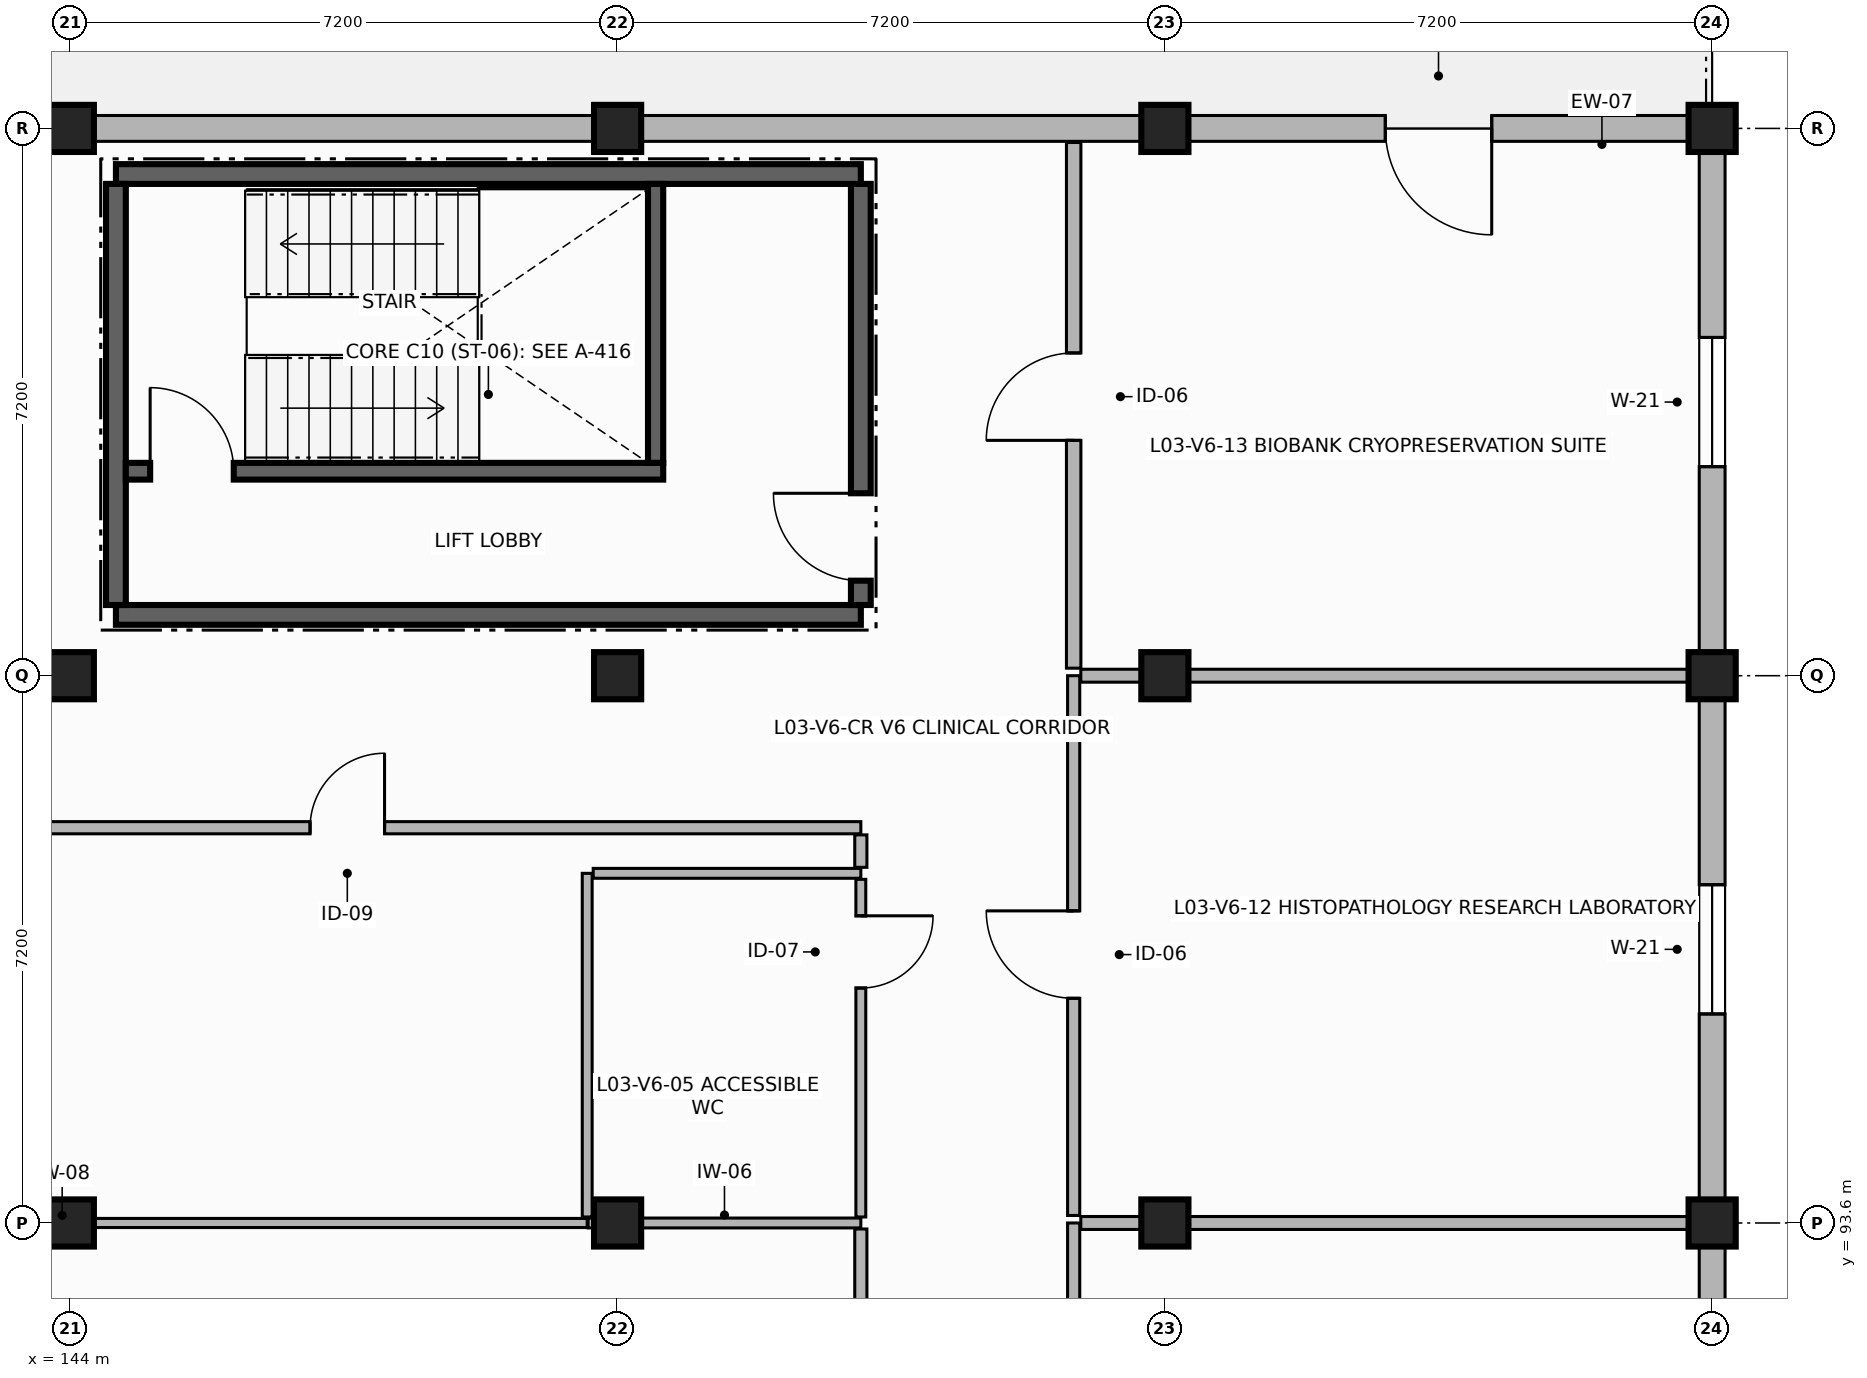
"""IFC4 building model, lengths in metres.
Left out: names, types, materials, properties, quantities, classifications, styles, units other than length and angle.
Written with IfcOpenShell. Run it as: python <this file> out.ifc"""

import sys

from ifc_helpers import new_model, si_unit, direction, frame, frame_2d, origin, origin_2d, place, context, subcontext, project, spatial, rectangle, extrude, element, fill, save


model = new_model("IFC4")
c1 = context("Model", 3, precision=1e-05, world=origin(), true_north=direction((0.0, 1.0)))
c2 = subcontext(c1, "Body", "Model", "MODEL_VIEW")
j1 = project(units=[si_unit("LENGTHUNIT", "METRE"), si_unit("PLANEANGLEUNIT", "RADIAN")], contexts=[c1])
p1 = place(None, origin())
s1 = spatial("IfcSite", under=j1, at=p1, CompositionType="ELEMENT")
p2 = place(p1, origin())
s2 = spatial("IfcBuilding", under=s1, at=p2, CompositionType="ELEMENT")
p3 = place(p2, frame((0.0, 0.0, 12.3)))
s3 = spatial("IfcBuildingStorey", under=s2, at=p3, CompositionType="ELEMENT", Elevation=12.3)
for number, where, z_axis, x_axis in (
    (1, (144.0, 93.6, 0.0), (0.0, 0.0, 1.0), (1.0, 0.0, 0.0)),
    (2, (144.0, 100.8, 0.0), (0.0, 0.0, 1.0), (1.0, 0.0, 0.0)),
    (3, (144.0, 108.0, 0.0), (0.0, 0.0, 1.0), (1.0, 0.0, 0.0)),
    (4, (151.2, 93.6, 0.0), (0.0, 0.0, 1.0), (1.0, 0.0, 0.0)),
    (5, (151.2, 100.8, 0.0), (0.0, 0.0, 1.0), (1.0, 0.0, 0.0)),
    (6, (151.2, 108.0, 0.0), (0.0, 0.0, 1.0), (1.0, 0.0, 0.0)),
    (7, (158.4, 93.6, 0.0), (0.0, 0.0, 1.0), (1.0, 0.0, 0.0)),
    (8, (158.4, 100.8, 0.0), (0.0, 0.0, 1.0), (1.0, 0.0, 0.0)),
    (9, (158.4, 108.0, 0.0), (0.0, 0.0, 1.0), (1.0, 0.0, 0.0)),
    (10, (165.6, 93.6, 0.0), (0.0, 0.0, 1.0), (1.0, 0.0, 0.0)),
    (11, (165.6, 100.8, 0.0), (0.0, 0.0, 1.0), (1.0, 0.0, 0.0)),
    (12, (165.6, 108.0, 0.0), (0.0, 0.0, 1.0), (1.0, 0.0, 0.0)),
):
    element("IfcColumn", number, at=place(p3, frame(where, z_axis=z_axis, x_axis=x_axis)), inside=s3, PredefinedType="COLUMN", context=c2, shape_type="SweptSolid", body=[
        extrude(rectangle(XDim=0.62, YDim=0.62, at=origin_2d()), origin(), (0.0, 0.0, 1.0), 3.38),
    ])
p4 = place(p3, frame((165.6, 86.4, 0.0), z_axis=(0.0, 0.0, 1.0), x_axis=(0.0, 1.0, 0.0)))
e13 = element("IfcWall", 13, at=p4, inside=s3, PredefinedType="SOLIDWALL", context=c2, shape_type="SweptSolid", body=[
    extrude(rectangle(XDim=7.2, YDim=0.34, at=frame_2d((3.6, 0.0))), origin(), (0.0, 0.0, 1.0), 2.71),
])
p5 = place(p4, frame((2.75, 0.0, 0.85)))
e14 = element("IfcOpeningElement", 14, at=p5, cuts=e13, PredefinedType="OPENING", context=c2, shape_type="SweptSolid", body=[
    extrude(rectangle(XDim=1.7, YDim=1.65, at=frame_2d((0.85, 0.825))), frame((0.0, 0.18, 0.0), z_axis=(0.0, -1.0, 0.0), x_axis=(1.0, 0.0, 0.0)), (0.0, 0.0, 1.0), 0.36),
])
p6 = place(p3, frame((165.6, 93.6, 0.0), z_axis=(0.0, 0.0, 1.0), x_axis=(0.0, 1.0, 0.0)))
e15 = element("IfcWall", 15, at=p6, inside=s3, PredefinedType="SOLIDWALL", context=c2, shape_type="SweptSolid", body=[
    extrude(rectangle(XDim=7.2, YDim=0.34, at=frame_2d((3.6, 0.0))), origin(), (0.0, 0.0, 1.0), 2.71),
])
p7 = place(p6, frame((2.75, 0.0, 0.85)))
e16 = element("IfcOpeningElement", 16, at=p7, cuts=e15, PredefinedType="OPENING", context=c2, shape_type="SweptSolid", body=[
    extrude(rectangle(XDim=1.7, YDim=1.65, at=frame_2d((0.85, 0.825))), frame((0.0, 0.18, 0.0), z_axis=(0.0, -1.0, 0.0), x_axis=(1.0, 0.0, 0.0)), (0.0, 0.0, 1.0), 0.36),
])
p8 = place(p3, frame((165.6, 100.8, 0.0), z_axis=(0.0, 0.0, 1.0), x_axis=(0.0, 1.0, 0.0)))
e17 = element("IfcWall", 17, at=p8, inside=s3, PredefinedType="SOLIDWALL", context=c2, shape_type="SweptSolid", body=[
    extrude(rectangle(XDim=7.2, YDim=0.34, at=frame_2d((3.6, 0.0))), origin(), (0.0, 0.0, 1.0), 2.71),
])
p9 = place(p8, frame((2.75, 0.0, 0.85)))
e18 = element("IfcOpeningElement", 18, at=p9, cuts=e17, PredefinedType="OPENING", context=c2, shape_type="SweptSolid", body=[
    extrude(rectangle(XDim=1.7, YDim=1.65, at=frame_2d((0.85, 0.825))), frame((0.0, 0.18, 0.0), z_axis=(0.0, -1.0, 0.0), x_axis=(1.0, 0.0, 0.0)), (0.0, 0.0, 1.0), 0.36),
])
p10 = place(p3, frame((165.6, 108.0, 0.0), z_axis=(0.0, 0.0, 1.0), x_axis=(-1.0, 0.0, 0.0)))
e19 = element("IfcWall", 19, at=p10, inside=s3, PredefinedType="SOLIDWALL", context=c2, shape_type="SweptSolid", body=[
    extrude(rectangle(XDim=7.2, YDim=0.34, at=frame_2d((3.6, 0.0))), origin(), (0.0, 0.0, 1.0), 2.71),
])
p11 = place(p10, frame((2.9, 0.0, 0.0)))
e20 = element("IfcOpeningElement", 20, at=p11, cuts=e19, PredefinedType="OPENING", context=c2, shape_type="SweptSolid", body=[
    extrude(rectangle(XDim=1.4, YDim=2.25, at=frame_2d((0.7, 1.125))), frame((0.0, 0.18, 0.0), z_axis=(0.0, -1.0, 0.0), x_axis=(1.0, 0.0, 0.0)), (0.0, 0.0, 1.0), 0.36),
])
for number, where, z_axis, x_axis in (
    (21, (158.4, 108.0, 0.0), (0.0, 0.0, 1.0), (-1.0, 0.0, 0.0)),
    (22, (151.2, 108.0, 0.0), (0.0, 0.0, 1.0), (-1.0, 0.0, 0.0)),
):
    element("IfcWall", number, at=place(p3, frame(where, z_axis=z_axis, x_axis=x_axis)), inside=s3, PredefinedType="SOLIDWALL", context=c2, shape_type="SweptSolid", body=[
        extrude(rectangle(XDim=7.2, YDim=0.34, at=frame_2d((3.6, 0.0))), origin(), (0.0, 0.0, 1.0), 2.71),
    ])
p12 = place(p3, frame((144.0, 108.0, 0.0), z_axis=(0.0, 0.0, 1.0), x_axis=(-1.0, 0.0, 0.0)))
e23 = element("IfcWall", 23, at=p12, inside=s3, PredefinedType="SOLIDWALL", context=c2, shape_type="SweptSolid", body=[
    extrude(rectangle(XDim=7.2, YDim=0.34, at=frame_2d((3.6, 0.0))), origin(), (0.0, 0.0, 1.0), 2.71),
])
p13 = place(p12, frame((3.75, 0.0, 0.85)))
e24 = element("IfcOpeningElement", 24, at=p13, cuts=e23, PredefinedType="OPENING", context=c2, shape_type="SweptSolid", body=[
    extrude(rectangle(XDim=1.7, YDim=1.65, at=frame_2d((0.85, 0.825))), frame((0.0, 0.18, 0.0), z_axis=(0.0, -1.0, 0.0), x_axis=(1.0, 0.0, 0.0)), (0.0, 0.0, 1.0), 0.36),
])
p14 = place(p3, frame((144.6, 101.6, 0.0), z_axis=(0.0, 0.0, 1.0), x_axis=(1.0, 0.0, 0.0)))
e25 = element("IfcWall", 25, at=p14, inside=s3, PredefinedType="SHEAR", context=c2, shape_type="SweptSolid", body=[
    extrude(rectangle(XDim=9.8, YDim=0.26, at=frame_2d((4.9, 0.0))), origin(), (0.0, 0.0, 1.0), 3.38),
])
p15 = place(p3, frame((154.4, 101.73, 0.0), z_axis=(0.0, 0.0, 1.0), x_axis=(0.0, 1.0, 0.0)))
e26 = element("IfcWall", 26, at=p15, inside=s3, PredefinedType="SHEAR", context=c2, shape_type="SweptSolid", body=[
    extrude(rectangle(XDim=5.54, YDim=0.26, at=frame_2d((2.77, 0.0))), origin(), (0.0, 0.0, 1.0), 3.38),
])
p16 = place(p15, frame((0.32, 0.0, 0.0)))
e27 = element("IfcOpeningElement", 27, at=p16, cuts=e26, PredefinedType="OPENING", context=c2, shape_type="SweptSolid", body=[
    extrude(rectangle(XDim=1.15, YDim=2.2, at=frame_2d((0.575, 1.1))), frame((0.0, 0.14, 0.0), z_axis=(0.0, -1.0, 0.0), x_axis=(1.0, 0.0, 0.0)), (0.0, 0.0, 1.0), 0.28),
])
p17 = place(p3, frame((154.4, 107.4, 0.0), z_axis=(0.0, 0.0, 1.0), x_axis=(-1.0, 0.0, 0.0)))
e28 = element("IfcWall", 28, at=p17, inside=s3, PredefinedType="SHEAR", context=c2, shape_type="SweptSolid", body=[
    extrude(rectangle(XDim=9.8, YDim=0.26, at=frame_2d((4.9, 0.0))), origin(), (0.0, 0.0, 1.0), 3.38),
])
p18 = place(p3, frame((144.6, 107.27, 0.0), z_axis=(0.0, 0.0, 1.0), x_axis=(0.0, -1.0, 0.0)))
e29 = element("IfcWall", 29, at=p18, inside=s3, PredefinedType="SHEAR", context=c2, shape_type="SweptSolid", body=[
    extrude(rectangle(XDim=5.54, YDim=0.26, at=frame_2d((2.77, 0.0))), origin(), (0.0, 0.0, 1.0), 3.38),
])
p19 = place(p3, frame((144.73, 103.49, 0.0), z_axis=(0.0, 0.0, 1.0), x_axis=(1.0, 0.0, 0.0)))
e30 = element("IfcWall", 30, at=p19, inside=s3, PredefinedType="SHEAR", context=c2, shape_type="SweptSolid", body=[
    extrude(rectangle(XDim=7.07, YDim=0.22, at=frame_2d((3.535, 0.0))), origin(), (0.0, 0.0, 1.0), 3.38),
])
p20 = place(p19, frame((0.32, 0.0, 0.0)))
e31 = element("IfcOpeningElement", 31, at=p20, cuts=e30, PredefinedType="OPENING", context=c2, shape_type="SweptSolid", body=[
    extrude(rectangle(XDim=1.1, YDim=2.15, at=frame_2d((0.55, 1.075))), frame((0.0, 0.12, 0.0), z_axis=(0.0, -1.0, 0.0), x_axis=(1.0, 0.0, 0.0)), (0.0, 0.0, 1.0), 0.24),
])
p21 = place(p3, frame((151.7, 103.6, 0.0), z_axis=(0.0, 0.0, 1.0), x_axis=(0.0, 1.0, 0.0)))
e32 = element("IfcWall", 32, at=p21, inside=s3, PredefinedType="SHEAR", context=c2, shape_type="SweptSolid", body=[
    extrude(rectangle(XDim=3.67, YDim=0.2, at=frame_2d((1.835, 0.0))), origin(), (0.0, 0.0, 1.0), 3.38),
])
p22 = place(p3, frame((136.985, 93.6, 0.0), z_axis=(0.0, 0.0, 1.0), x_axis=(1.0, 0.0, 0.0)))
e33 = element("IfcWall", 33, at=p22, inside=s3, PredefinedType="PARTITIONING", context=c2, shape_type="SweptSolid", body=[
    extrude(rectangle(XDim=13.815, YDim=0.12, at=frame_2d((6.907, 0.0))), origin(), (0.0, 0.0, 1.0), 2.69),
])
p23 = place(p3, frame((150.812, 93.6, 0.0), z_axis=(0.0, 0.0, 1.0), x_axis=(1.0, 0.0, 0.0)))
e34 = element("IfcWall", 34, at=p23, inside=s3, PredefinedType="PARTITIONING", context=c2, shape_type="SweptSolid", body=[
    extrude(rectangle(XDim=3.588, YDim=0.13, at=frame_2d((1.794, 0.0))), origin(), (0.0, 0.0, 1.0), 2.69),
])
p24 = place(p3, frame((154.4, 93.521, 0.0), z_axis=(0.0, 0.0, 1.0), x_axis=(0.0, -1.0, 0.0)))
e35 = element("IfcWall", 35, at=p24, inside=s3, PredefinedType="PARTITIONING", context=c2, shape_type="SweptSolid", body=[
    extrude(rectangle(XDim=7.022, YDim=0.16, at=frame_2d((3.511, 0.0))), origin(), (0.0, 0.0, 1.0), 2.69),
])
p25 = place(p24, frame((3.001, 0.0, 0.0)))
e36 = element("IfcOpeningElement", 36, at=p25, cuts=e35, PredefinedType="OPENING", context=c2, shape_type="SweptSolid", body=[
    extrude(rectangle(XDim=1.02, YDim=2.15, at=frame_2d((0.51, 1.075))), frame((0.0, 0.09, 0.0), z_axis=(0.0, -1.0, 0.0), x_axis=(1.0, 0.0, 0.0)), (0.0, 0.0, 1.0), 0.18),
])
p26 = place(p3, frame((150.8, 93.679, 0.0), z_axis=(0.0, 0.0, 1.0), x_axis=(0.0, 1.0, 0.0)))
e37 = element("IfcWall", 37, at=p26, inside=s3, PredefinedType="PARTITIONING", context=c2, shape_type="SweptSolid", body=[
    extrude(rectangle(XDim=4.521, YDim=0.13, at=frame_2d((2.26, 0.0))), origin(), (0.0, 0.0, 1.0), 2.69),
])
p27 = place(p3, frame((150.879, 98.2, 0.0), z_axis=(0.0, 0.0, 1.0), x_axis=(1.0, 0.0, 0.0)))
e38 = element("IfcWall", 38, at=p27, inside=s3, PredefinedType="PARTITIONING", context=c2, shape_type="SweptSolid", body=[
    extrude(rectangle(XDim=3.521, YDim=0.13, at=frame_2d((1.76, 0.0))), origin(), (0.0, 0.0, 1.0), 2.69),
])
p28 = place(p3, frame((154.4, 98.121, 0.0), z_axis=(0.0, 0.0, 1.0), x_axis=(0.0, -1.0, 0.0)))
e39 = element("IfcWall", 39, at=p28, inside=s3, PredefinedType="PARTITIONING", context=c2, shape_type="SweptSolid", body=[
    extrude(rectangle(XDim=4.442, YDim=0.13, at=frame_2d((2.221, 0.0))), origin(), (0.0, 0.0, 1.0), 2.69),
])
p29 = place(p28, frame((0.48, 0.0, 0.0)))
e40 = element("IfcOpeningElement", 40, at=p29, cuts=e39, PredefinedType="OPENING", context=c2, shape_type="SweptSolid", body=[
    extrude(rectangle(XDim=0.95, YDim=2.1, at=frame_2d((0.475, 1.05))), frame((0.0, 0.075, 0.0), z_axis=(0.0, -1.0, 0.0), x_axis=(1.0, 0.0, 0.0)), (0.0, 0.0, 1.0), 0.15),
])
p30 = place(p3, frame((142.094, 98.8, 0.0), z_axis=(0.0, 0.0, 1.0), x_axis=(1.0, 0.0, 0.0)))
e41 = element("IfcWall", 41, at=p30, inside=s3, PredefinedType="PARTITIONING", context=c2, shape_type="SweptSolid", body=[
    extrude(rectangle(XDim=12.306, YDim=0.16, at=frame_2d((6.153, 0.0))), origin(), (0.0, 0.0, 1.0), 2.69),
])
p31 = place(p30, frame((5.06, 0.0, 0.0)))
e42 = element("IfcOpeningElement", 42, at=p31, cuts=e41, PredefinedType="OPENING", context=c2, shape_type="SweptSolid", body=[
    extrude(rectangle(XDim=0.98, YDim=2.15, at=frame_2d((0.49, 1.075))), frame((0.0, 0.09, 0.0), z_axis=(0.0, -1.0, 0.0), x_axis=(1.0, 0.0, 0.0)), (0.0, 0.0, 1.0), 0.18),
])
p32 = place(p3, frame((154.4, 98.706, 0.0), z_axis=(0.0, 0.0, 1.0), x_axis=(0.0, -1.0, 0.0)))
e43 = element("IfcWall", 43, at=p32, inside=s3, PredefinedType="PARTITIONING", context=c2, shape_type="SweptSolid", body=[
    extrude(rectangle(XDim=0.427, YDim=0.16, at=frame_2d((0.213, 0.0))), origin(), (0.0, 0.0, 1.0), 2.69),
])
p33 = place(p3, frame((157.2, 86.499, 0.0), z_axis=(0.0, 0.0, 1.0), x_axis=(0.0, 1.0, 0.0)))
e44 = element("IfcWall", 44, at=p33, inside=s3, PredefinedType="PARTITIONING", context=c2, shape_type="SweptSolid", body=[
    extrude(rectangle(XDim=7.101, YDim=0.16, at=frame_2d((3.551, 0.0))), origin(), (0.0, 0.0, 1.0), 2.69),
])
p34 = place(p33, frame((2.857, 0.0, 0.0)))
e45 = element("IfcOpeningElement", 45, at=p34, cuts=e44, PredefinedType="OPENING", context=c2, shape_type="SweptSolid", body=[
    extrude(rectangle(XDim=1.15, YDim=2.25, at=frame_2d((0.575, 1.125))), frame((0.0, 0.09, 0.0), z_axis=(0.0, -1.0, 0.0), x_axis=(1.0, 0.0, 0.0)), (0.0, 0.0, 1.0), 0.18),
])
p35 = place(p3, frame((157.294, 93.6, 0.0), z_axis=(0.0, 0.0, 1.0), x_axis=(1.0, 0.0, 0.0)))
e46 = element("IfcWall", 46, at=p35, inside=s3, PredefinedType="PARTITIONING", context=c2, shape_type="SweptSolid", body=[
    extrude(rectangle(XDim=8.121, YDim=0.17, at=frame_2d((4.061, 0.0))), origin(), (0.0, 0.0, 1.0), 2.69),
])
p36 = place(p3, frame((157.2, 93.699, 0.0), z_axis=(0.0, 0.0, 1.0), x_axis=(0.0, 1.0, 0.0)))
e47 = element("IfcWall", 47, at=p36, inside=s3, PredefinedType="PARTITIONING", context=c2, shape_type="SweptSolid", body=[
    extrude(rectangle(XDim=7.101, YDim=0.16, at=frame_2d((3.551, 0.0))), origin(), (0.0, 0.0, 1.0), 2.69),
])
p37 = place(p36, frame((2.857, 0.0, 0.0)))
e48 = element("IfcOpeningElement", 48, at=p37, cuts=e47, PredefinedType="OPENING", context=c2, shape_type="SweptSolid", body=[
    extrude(rectangle(XDim=1.15, YDim=2.25, at=frame_2d((0.575, 1.125))), frame((0.0, 0.09, 0.0), z_axis=(0.0, -1.0, 0.0), x_axis=(1.0, 0.0, 0.0)), (0.0, 0.0, 1.0), 0.18),
])
p38 = place(p3, frame((157.294, 100.8, 0.0), z_axis=(0.0, 0.0, 1.0), x_axis=(1.0, 0.0, 0.0)))
e49 = element("IfcWall", 49, at=p38, inside=s3, PredefinedType="PARTITIONING", context=c2, shape_type="SweptSolid", body=[
    extrude(rectangle(XDim=8.121, YDim=0.17, at=frame_2d((4.061, 0.0))), origin(), (0.0, 0.0, 1.0), 2.69),
])
p39 = place(p3, frame((157.2, 100.899, 0.0), z_axis=(0.0, 0.0, 1.0), x_axis=(0.0, 1.0, 0.0)))
e50 = element("IfcWall", 50, at=p39, inside=s3, PredefinedType="PARTITIONING", context=c2, shape_type="SweptSolid", body=[
    extrude(rectangle(XDim=6.916, YDim=0.19, at=frame_2d((3.458, 0.0))), origin(), (0.0, 0.0, 1.0), 2.69),
])
p40 = place(p39, frame((2.997, 0.0, 0.0)))
e51 = element("IfcOpeningElement", 51, at=p40, cuts=e50, PredefinedType="OPENING", context=c2, shape_type="SweptSolid", body=[
    extrude(rectangle(XDim=1.15, YDim=2.25, at=frame_2d((0.575, 1.125))), frame((0.0, 0.105, 0.0), z_axis=(0.0, -1.0, 0.0), x_axis=(1.0, 0.0, 0.0)), (0.0, 0.0, 1.0), 0.21),
])
p41 = place(p7, origin())
e52 = element("IfcWindow", 52, at=p41, inside=s3, PartitioningType="SINGLE_PANEL", PredefinedType="WINDOW", context=c2, shape_type="SweptSolid", body=[
    extrude(rectangle(XDim=1.7, YDim=1.65, at=frame_2d((0.85, 0.825))), frame((0.0, 0.03, 0.0), z_axis=(0.0, -1.0, 0.0), x_axis=(1.0, 0.0, 0.0)), (0.0, 0.0, 1.0), 0.06),
])
fill(e16, e52)
p42 = place(p9, origin())
e53 = element("IfcWindow", 53, at=p42, inside=s3, PartitioningType="SINGLE_PANEL", PredefinedType="WINDOW", context=c2, shape_type="SweptSolid", body=[
    extrude(rectangle(XDim=1.7, YDim=1.65, at=frame_2d((0.85, 0.825))), frame((0.0, 0.03, 0.0), z_axis=(0.0, -1.0, 0.0), x_axis=(1.0, 0.0, 0.0)), (0.0, 0.0, 1.0), 0.06),
])
fill(e18, e53)
p43 = place(p11, origin())
e54 = element("IfcDoor", 54, at=p43, inside=s3, OperationType="SINGLE_SWING_LEFT", PredefinedType="DOOR", context=c2, shape_type="SweptSolid", body=[
    extrude(rectangle(XDim=1.4, YDim=2.25, at=frame_2d((0.7, 1.125))), frame((0.0, 0.025, 0.0), z_axis=(0.0, -1.0, 0.0), x_axis=(1.0, 0.0, 0.0)), (0.0, 0.0, 1.0), 0.05),
])
fill(e20, e54)
p44 = place(p20, origin())
e55 = element("IfcDoor", 55, at=p44, inside=s3, OperationType="SINGLE_SWING_LEFT", PredefinedType="DOOR", context=c2, shape_type="SweptSolid", body=[
    extrude(rectangle(XDim=1.1, YDim=2.15, at=frame_2d((0.55, 1.075))), frame((0.0, 0.025, 0.0), z_axis=(0.0, -1.0, 0.0), x_axis=(1.0, 0.0, 0.0)), (0.0, 0.0, 1.0), 0.05),
])
fill(e31, e55)
p45 = place(p16, origin())
e56 = element("IfcDoor", 56, at=p45, inside=s3, OperationType="SINGLE_SWING_RIGHT", PredefinedType="DOOR", context=c2, shape_type="SweptSolid", body=[
    extrude(rectangle(XDim=1.15, YDim=2.2, at=frame_2d((0.575, 1.1))), frame((0.0, 0.025, 0.0), z_axis=(0.0, -1.0, 0.0), x_axis=(1.0, 0.0, 0.0)), (0.0, 0.0, 1.0), 0.05),
])
fill(e27, e56)
p46 = place(p29, origin())
e57 = element("IfcDoor", 57, at=p46, inside=s3, OperationType="SINGLE_SWING_LEFT", PredefinedType="DOOR", context=c2, shape_type="SweptSolid", body=[
    extrude(rectangle(XDim=0.95, YDim=2.1, at=frame_2d((0.475, 1.05))), frame((0.0, 0.025, 0.0), z_axis=(0.0, -1.0, 0.0), x_axis=(1.0, 0.0, 0.0)), (0.0, 0.0, 1.0), 0.05),
])
fill(e40, e57)
p47 = place(p31, origin())
e58 = element("IfcDoor", 58, at=p47, inside=s3, OperationType="SINGLE_SWING_RIGHT", PredefinedType="DOOR", context=c2, shape_type="SweptSolid", body=[
    extrude(rectangle(XDim=0.98, YDim=2.15, at=frame_2d((0.49, 1.075))), frame((0.0, 0.025, 0.0), z_axis=(0.0, -1.0, 0.0), x_axis=(1.0, 0.0, 0.0)), (0.0, 0.0, 1.0), 0.05),
])
fill(e42, e58)
p48 = place(p37, origin())
e59 = element("IfcDoor", 59, at=p48, inside=s3, OperationType="SINGLE_SWING_RIGHT", PredefinedType="DOOR", context=c2, shape_type="SweptSolid", body=[
    extrude(rectangle(XDim=1.15, YDim=2.25, at=frame_2d((0.575, 1.125))), frame((0.0, 0.025, 0.0), z_axis=(0.0, -1.0, 0.0), x_axis=(1.0, 0.0, 0.0)), (0.0, 0.0, 1.0), 0.05),
])
fill(e48, e59)
p49 = place(p40, origin())
e60 = element("IfcDoor", 60, at=p49, inside=s3, OperationType="SINGLE_SWING_LEFT", PredefinedType="DOOR", context=c2, shape_type="SweptSolid", body=[
    extrude(rectangle(XDim=1.15, YDim=2.25, at=frame_2d((0.575, 1.125))), frame((0.0, 0.025, 0.0), z_axis=(0.0, -1.0, 0.0), x_axis=(1.0, 0.0, 0.0)), (0.0, 0.0, 1.0), 0.05),
])
fill(e51, e60)
save(model, sys.argv[1])
